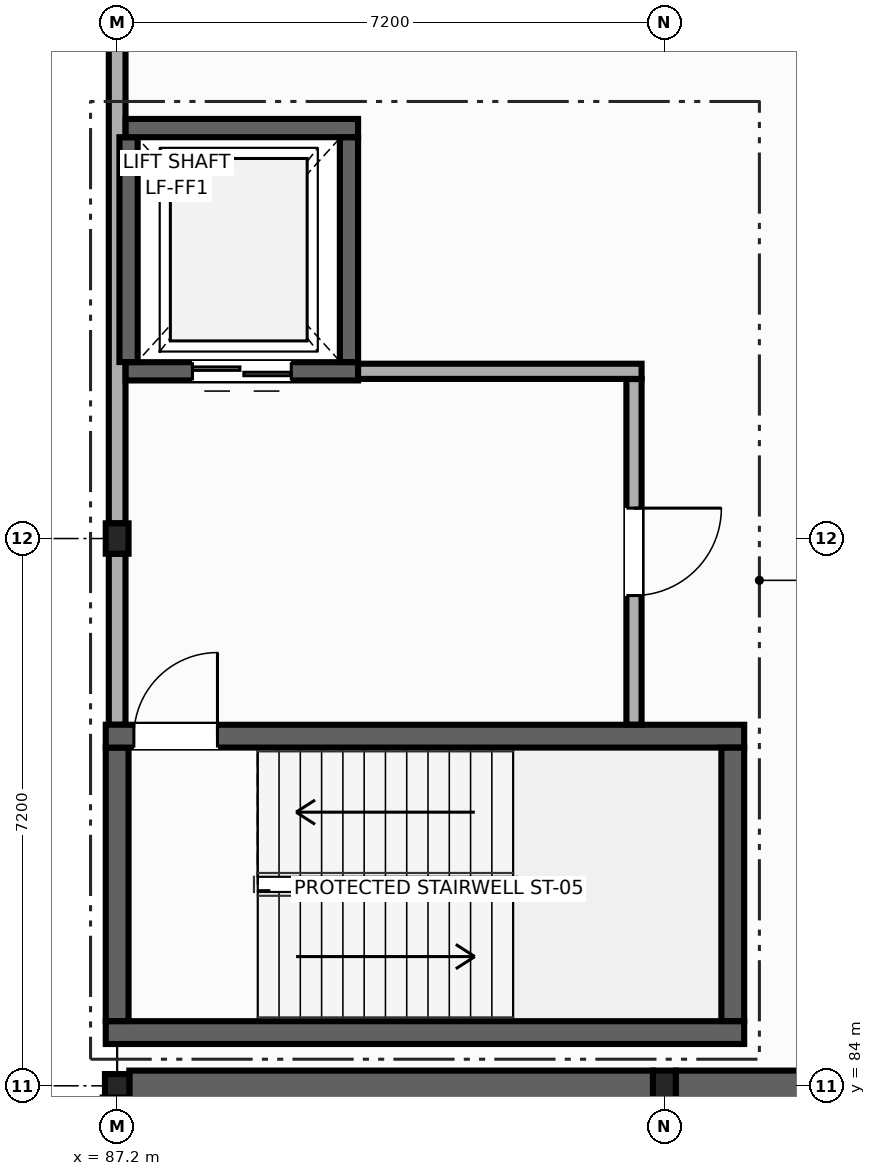
"""IFC4 building model, lengths in metres.
Left out: names, types, materials, properties, quantities, classifications, styles, units other than length and angle.
Written with IfcOpenShell. Run it as: python <this file> out.ifc"""

import sys

from ifc_helpers import new_model, si_unit, direction, frame, frame_2d, origin, origin_2d, place, context, subcontext, project, spatial, rectangle, i_section, extrude, element, fill, save


model = new_model("IFC4")
c1 = context("Model", 3, precision=1e-05, world=origin(), true_north=direction((0.0, 1.0)))
c2 = subcontext(c1, "Body", "Model", "MODEL_VIEW")
j1 = project(units=[si_unit("LENGTHUNIT", "METRE"), si_unit("PLANEANGLEUNIT", "RADIAN")], contexts=[c1])
p1 = place(None, origin())
s1 = spatial("IfcSite", under=j1, at=p1, CompositionType="ELEMENT")
p2 = place(p1, origin())
s2 = spatial("IfcBuilding", under=s1, at=p2, CompositionType="ELEMENT")
p3 = place(p2, frame((0.0, 0.0, 14.4)))
s3 = spatial("IfcBuildingStorey", under=s2, at=p3, CompositionType="ELEMENT", Elevation=14.4)
p4 = place(p3, frame((87.2, 84.0, 0.0), z_axis=(0.0, 0.0, 1.0), x_axis=(0.0, 1.0, 0.0)))
e1 = element("IfcColumn", 1, at=p4, inside=s3, PredefinedType="COLUMN", context=c2, shape_type="SweptSolid", body=[
    extrude(i_section(OverallWidth=0.309, OverallDepth=0.321, WebThickness=0.014, FlangeThickness=0.022, at=origin_2d()), origin(), (0.0, 0.0, 1.0), 4.5),
])
for number, where, z_axis, x_axis in (
    (2, (94.4, 84.0, 0.0), (0.0, 0.0, 1.0), (1.0, 0.0, 0.0)),
    (3, (87.2, 91.2, 0.0), (0.0, 0.0, 1.0), (1.0, 0.0, 0.0)),
):
    element("IfcColumn", number, at=place(p3, frame(where, z_axis=z_axis, x_axis=x_axis)), inside=s3, PredefinedType="COLUMN", context=c2, shape_type="SweptSolid", body=[
        extrude(i_section(OverallWidth=0.3, OverallDepth=0.4, WebThickness=0.013, FlangeThickness=0.024, at=origin_2d()), origin(), (0.0, 0.0, 1.0), 4.5),
    ])
p5 = place(p3, frame((87.2, 88.75, 0.0), z_axis=(0.0, 0.0, 1.0), x_axis=(0.0, 1.0, 0.0)))
e4 = element("IfcWall", 4, at=p5, inside=s3, PredefinedType="SOLIDWALL", context=c2, shape_type="SweptSolid", body=[
    extrude(rectangle(XDim=2.25, YDim=0.22, at=frame_2d((1.125, 0.0))), origin(), (0.0, 0.0, 1.0), 3.655),
])
p6 = place(p3, frame((87.2, 91.4, 0.0), z_axis=(0.0, 0.0, 1.0), x_axis=(0.0, 1.0, 0.0)))
e5 = element("IfcWall", 5, at=p6, inside=s3, PredefinedType="SOLIDWALL", context=c2, shape_type="SweptSolid", body=[
    extrude(rectangle(XDim=6.85, YDim=0.22, at=frame_2d((3.425, 0.0))), origin(), (0.0, 0.0, 1.0), 3.655),
])
p7 = place(p3, frame((95.45, 84.7, 0.0), z_axis=(0.0, 0.0, 1.0), x_axis=(-1.0, 0.0, 0.0)))
e6 = element("IfcWall", 6, at=p7, inside=s3, PredefinedType="SHEAR", context=c2, shape_type="SweptSolid", body=[
    extrude(rectangle(XDim=8.4, YDim=0.3, at=frame_2d((4.2, 0.0))), origin(), (0.0, 0.0, 1.0), 4.26),
])
p8 = place(p3, frame((87.2, 84.852, 0.0), z_axis=(0.0, 0.0, 1.0), x_axis=(0.0, 1.0, 0.0)))
e7 = element("IfcWall", 7, at=p8, inside=s3, PredefinedType="SHEAR", context=c2, shape_type="SweptSolid", body=[
    extrude(rectangle(XDim=3.598, YDim=0.3, at=frame_2d((1.799, 0.0))), origin(), (0.0, 0.0, 1.0), 4.26),
])
p9 = place(p3, frame((87.05, 88.6, 0.0), z_axis=(0.0, 0.0, 1.0), x_axis=(1.0, 0.0, 0.0)))
e8 = element("IfcWall", 8, at=p9, inside=s3, PredefinedType="SHEAR", context=c2, shape_type="SweptSolid", body=[
    extrude(rectangle(XDim=8.4, YDim=0.3, at=frame_2d((4.2, 0.0))), origin(), (0.0, 0.0, 1.0), 4.26),
])
p10 = place(p9, frame((0.37, 0.0, 0.0)))
e9 = element("IfcOpeningElement", 9, at=p10, cuts=e8, PredefinedType="OPENING", context=c2, shape_type="SweptSolid", body=[
    extrude(rectangle(XDim=1.1, YDim=2.15, at=frame_2d((0.55, 1.075))), frame((0.0, 0.16, 0.0), z_axis=(0.0, -1.0, 0.0), x_axis=(1.0, 0.0, 0.0)), (0.0, 0.0, 1.0), 0.32),
])
p11 = place(p3, frame((95.3, 88.448, 0.0), z_axis=(0.0, 0.0, 1.0), x_axis=(0.0, -1.0, 0.0)))
e10 = element("IfcWall", 10, at=p11, inside=s3, PredefinedType="SHEAR", context=c2, shape_type="SweptSolid", body=[
    extrude(rectangle(XDim=3.596, YDim=0.3, at=frame_2d((1.798, 0.0))), origin(), (0.0, 0.0, 1.0), 4.26),
])
p12 = place(p3, frame((90.37, 93.4, 0.0), z_axis=(0.0, 0.0, 1.0), x_axis=(-1.0, 0.0, 0.0)))
e11 = element("IfcWall", 11, at=p12, inside=s3, PredefinedType="SHEAR", context=c2, shape_type="SweptSolid", body=[
    extrude(rectangle(XDim=3.058, YDim=0.24, at=frame_2d((1.529, 0.0))), origin(), (0.0, 0.0, 1.0), 4.26),
])
p13 = place(p12, frame((0.879, 0.0, 0.0)))
e12 = element("IfcOpeningElement", 12, at=p13, cuts=e11, PredefinedType="OPENING", context=c2, shape_type="SweptSolid", body=[
    extrude(rectangle(XDim=1.3, YDim=2.15, at=frame_2d((0.65, 1.075))), frame((0.0, 0.13, 0.0), z_axis=(0.0, -1.0, 0.0), x_axis=(1.0, 0.0, 0.0)), (0.0, 0.0, 1.0), 0.26),
])
p14 = place(p3, frame((87.35, 93.522, 0.0), z_axis=(0.0, 0.0, 1.0), x_axis=(0.0, 1.0, 0.0)))
e13 = element("IfcWall", 13, at=p14, inside=s3, PredefinedType="SHEAR", context=c2, shape_type="SweptSolid", body=[
    extrude(rectangle(XDim=2.958, YDim=0.24, at=frame_2d((1.479, 0.0))), origin(), (0.0, 0.0, 1.0), 4.26),
])
p15 = place(p3, frame((87.312, 96.6, 0.0), z_axis=(0.0, 0.0, 1.0), x_axis=(1.0, 0.0, 0.0)))
e14 = element("IfcWall", 14, at=p15, inside=s3, PredefinedType="SHEAR", context=c2, shape_type="SweptSolid", body=[
    extrude(rectangle(XDim=3.058, YDim=0.24, at=frame_2d((1.529, 0.0))), origin(), (0.0, 0.0, 1.0), 4.26),
])
p16 = place(p3, frame((90.25, 96.478, 0.0), z_axis=(0.0, 0.0, 1.0), x_axis=(0.0, -1.0, 0.0)))
e15 = element("IfcWall", 15, at=p16, inside=s3, PredefinedType="SHEAR", context=c2, shape_type="SweptSolid", body=[
    extrude(rectangle(XDim=2.956, YDim=0.24, at=frame_2d((1.478, 0.0))), origin(), (0.0, 0.0, 1.0), 4.26),
])
p17 = place(p3, frame((90.37, 93.4, 0.0), z_axis=(0.0, 0.0, 1.0), x_axis=(1.0, 0.0, 0.0)))
e16 = element("IfcWall", 16, at=p17, inside=s3, PredefinedType="PARTITIONING", context=c2, shape_type="SweptSolid", body=[
    extrude(rectangle(XDim=3.73, YDim=0.2, at=frame_2d((1.865, 0.0))), origin(), (0.0, 0.0, 1.0), 4.26),
])
p18 = place(p3, frame((94.0, 93.298, 0.0), z_axis=(0.0, 0.0, 1.0), x_axis=(0.0, -1.0, 0.0)))
e17 = element("IfcWall", 17, at=p18, inside=s3, PredefinedType="PARTITIONING", context=c2, shape_type="SweptSolid", body=[
    extrude(rectangle(XDim=4.546, YDim=0.2, at=frame_2d((2.273, 0.0))), origin(), (0.0, 0.0, 1.0), 4.26),
])
p19 = place(p18, frame((1.698, 0.0, 0.0)))
e18 = element("IfcOpeningElement", 18, at=p19, cuts=e17, PredefinedType="OPENING", context=c2, shape_type="SweptSolid", body=[
    extrude(rectangle(XDim=1.15, YDim=2.15, at=frame_2d((0.575, 1.075))), frame((0.0, 0.11, 0.0), z_axis=(0.0, -1.0, 0.0), x_axis=(1.0, 0.0, 0.0)), (0.0, 0.0, 1.0), 0.22),
])
p20 = place(p3, frame((87.36, 84.0, 0.0), z_axis=(0.0, 0.0, 1.0), x_axis=(1.0, 0.0, 0.0)))
e19 = element("IfcWall", 19, at=p20, inside=s3, PredefinedType="SHEAR", context=c2, shape_type="SweptSolid", body=[
    extrude(rectangle(XDim=6.89, YDim=0.4, at=frame_2d((3.445, 0.0))), origin(), (0.0, 0.0, 1.0), 4.26),
])
p21 = place(p3, frame((94.55, 84.0, 0.0), z_axis=(0.0, 0.0, 1.0), x_axis=(1.0, 0.0, 0.0)))
e20 = element("IfcWall", 20, at=p21, inside=s3, PredefinedType="SHEAR", context=c2, shape_type="SweptSolid", body=[
    extrude(rectangle(XDim=6.85, YDim=0.4, at=frame_2d((3.425, 0.0))), origin(), (0.0, 0.0, 1.0), 9.318),
])
p22 = place(p10, origin())
e21 = element("IfcDoor", 21, at=p22, inside=s3, OperationType="SINGLE_SWING_RIGHT", PredefinedType="DOOR", context=c2, shape_type="SweptSolid", body=[
    extrude(rectangle(XDim=1.1, YDim=2.15, at=frame_2d((0.55, 1.075))), frame((0.0, 0.025, 0.0), z_axis=(0.0, -1.0, 0.0), x_axis=(1.0, 0.0, 0.0)), (0.0, 0.0, 1.0), 0.05),
])
fill(e9, e21)
p23 = place(p13, origin())
e22 = element("IfcDoor", 22, at=p23, inside=s3, OperationType="DOUBLE_DOOR_SLIDING", PredefinedType="DOOR", context=c2, shape_type="SweptSolid", body=[
    extrude(rectangle(XDim=1.3, YDim=2.15, at=frame_2d((0.65, 1.075))), frame((0.0, 0.025, 0.0), z_axis=(0.0, -1.0, 0.0), x_axis=(1.0, 0.0, 0.0)), (0.0, 0.0, 1.0), 0.05),
])
fill(e12, e22)
p24 = place(p19, origin())
e23 = element("IfcDoor", 23, at=p24, inside=s3, OperationType="SINGLE_SWING_LEFT", PredefinedType="DOOR", context=c2, shape_type="SweptSolid", body=[
    extrude(rectangle(XDim=1.15, YDim=2.15, at=frame_2d((0.575, 1.075))), frame((0.0, 0.025, 0.0), z_axis=(0.0, -1.0, 0.0), x_axis=(1.0, 0.0, 0.0)), (0.0, 0.0, 1.0), 0.05),
])
fill(e18, e23)
save(model, sys.argv[1])
